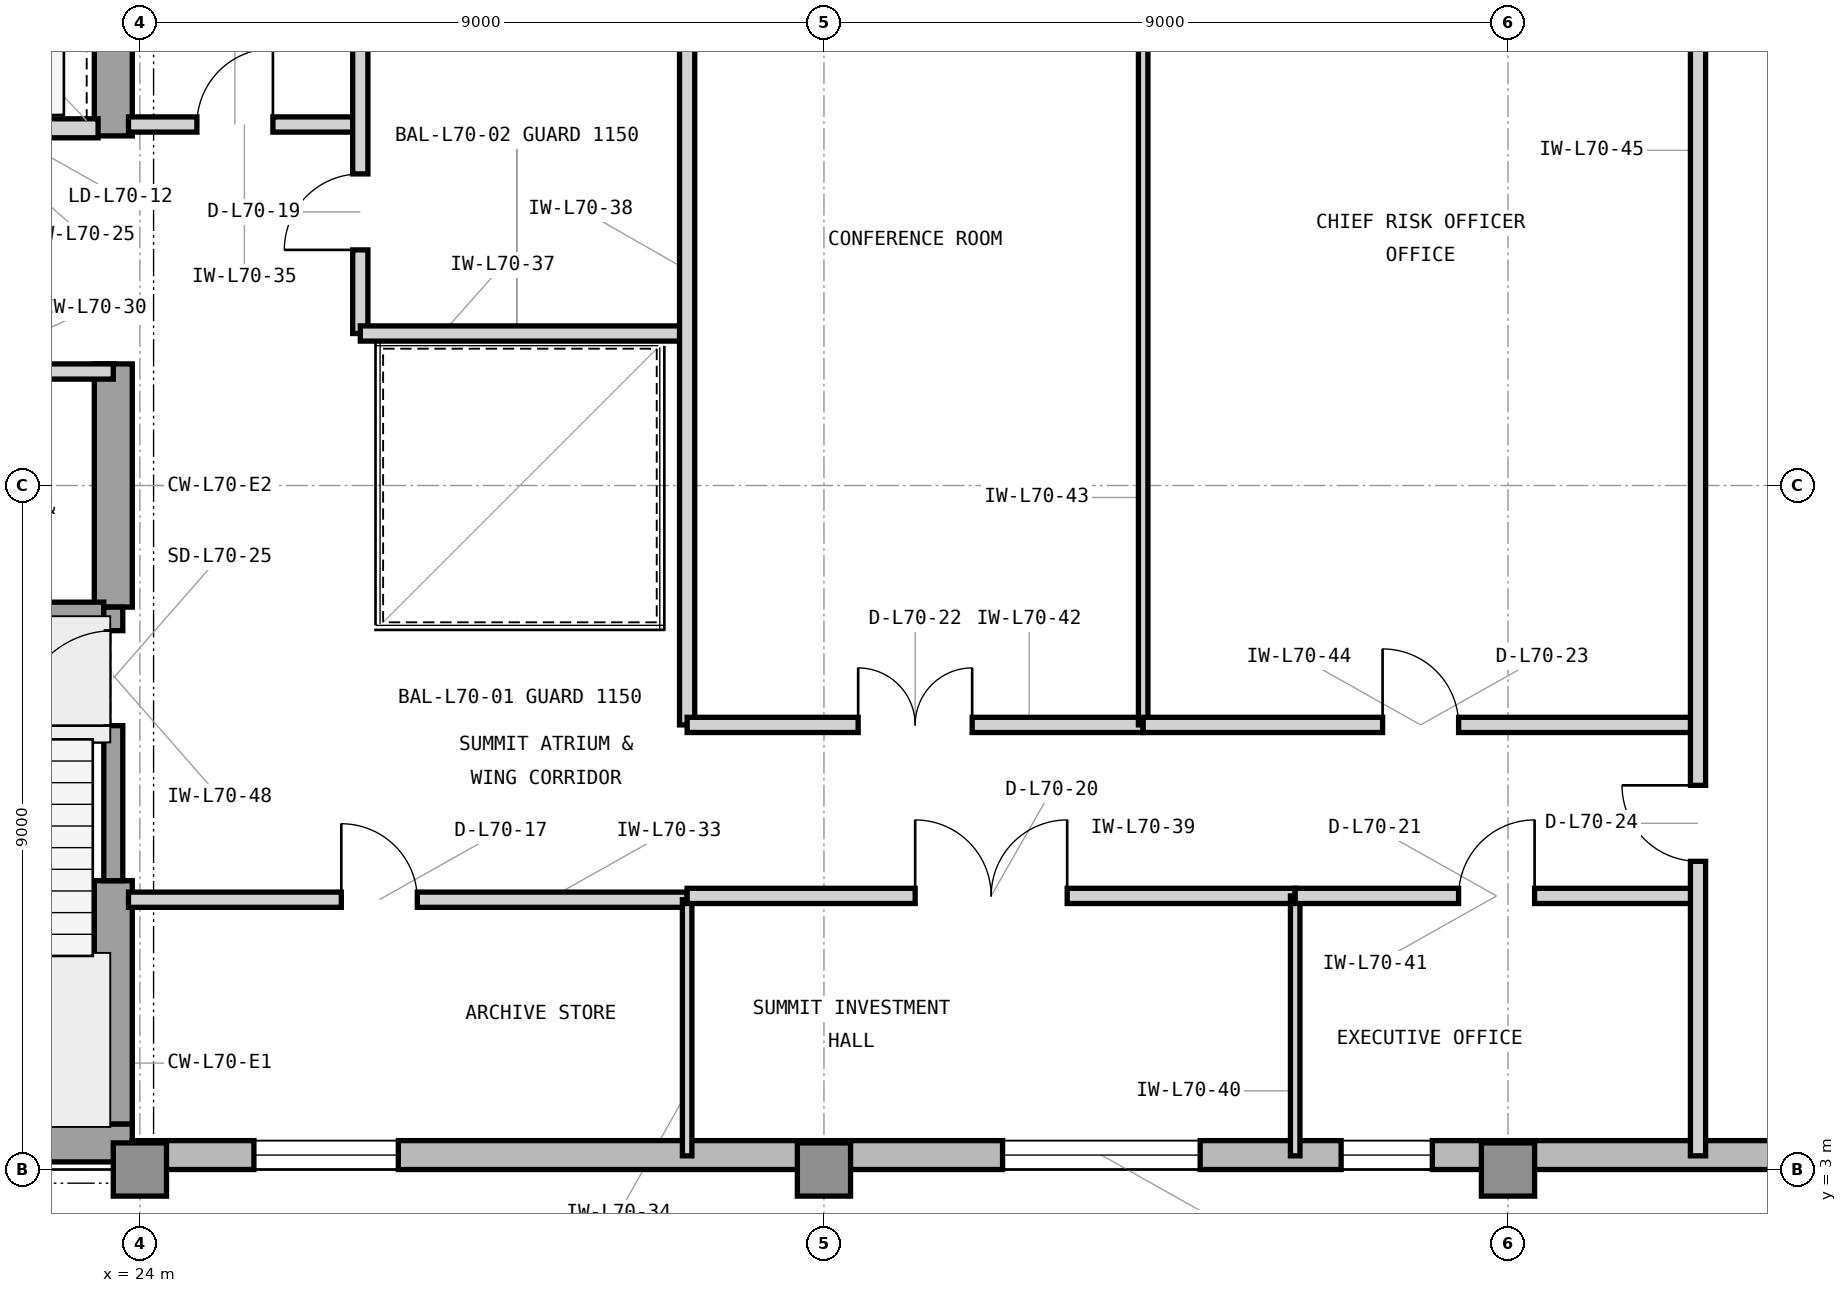
"""IFC4 building model, lengths in metres.
Left out: names, types, materials, properties, quantities, classifications, styles, units other than length and angle.
Written with IfcOpenShell. Run it as: python <this file> out.ifc"""

import sys

from ifc_helpers import new_model, si_unit, direction, frame, frame_2d, origin, origin_2d, place, context, subcontext, project, spatial, rectangle, extrude, element, fill, save


model = new_model("IFC4")
c1 = context("Model", 3, precision=1e-05, world=origin(), true_north=direction((0.0, 1.0)))
c2 = subcontext(c1, "Body", "Model", "MODEL_VIEW")
j1 = project(units=[si_unit("LENGTHUNIT", "METRE"), si_unit("PLANEANGLEUNIT", "RADIAN")], contexts=[c1])
p1 = place(None, origin())
s1 = spatial("IfcSite", under=j1, at=p1, CompositionType="ELEMENT")
p2 = place(p1, origin())
s2 = spatial("IfcBuilding", under=s1, at=p2, CompositionType="ELEMENT")
p3 = place(p2, frame((0.0, 0.0, 285.9)))
s3 = spatial("IfcBuildingStorey", under=s2, at=p3, CompositionType="ELEMENT", Elevation=285.9)
p4 = place(p3, frame((7.475, 3.35, 0.0), z_axis=(0.0, 0.0, 1.0), x_axis=(1.0, 0.0, 0.0)))
e1 = element("IfcWall", 1, at=p4, inside=s3, PredefinedType="SHEAR", context=c2, shape_type="SweptSolid", body=[
    extrude(rectangle(XDim=16.425, YDim=0.5, at=frame_2d((8.212, 0.0))), origin(), (0.0, 0.0, 1.0), 3.9),
])
p5 = place(p3, frame((23.65, 3.6, 0.0), z_axis=(0.0, 0.0, 1.0), x_axis=(0.0, 1.0, 0.0)))
e2 = element("IfcWall", 2, at=p5, inside=s3, PredefinedType="SHEAR", context=c2, shape_type="SweptSolid", body=[
    extrude(rectangle(XDim=3.2, YDim=0.5, at=frame_2d((1.6, 0.0))), origin(), (0.0, 0.0, 1.0), 3.9),
])
p6 = place(p3, frame((23.65, 10.4, 0.0), z_axis=(0.0, 0.0, 1.0), x_axis=(0.0, 1.0, 0.0)))
e3 = element("IfcWall", 3, at=p6, inside=s3, PredefinedType="SHEAR", context=c2, shape_type="SweptSolid", body=[
    extrude(rectangle(XDim=3.2, YDim=0.5, at=frame_2d((1.6, 0.0))), origin(), (0.0, 0.0, 1.0), 3.9),
])
p7 = place(p3, frame((23.65, 16.6, 0.0), z_axis=(0.0, 0.0, 1.0), x_axis=(0.0, 1.0, 0.0)))
e4 = element("IfcWall", 4, at=p7, inside=s3, PredefinedType="SHEAR", context=c2, shape_type="SweptSolid", body=[
    extrude(rectangle(XDim=4.05, YDim=0.5, at=frame_2d((2.025, 0.0))), origin(), (0.0, 0.0, 1.0), 3.9),
])
for number, where, z_axis, x_axis in (
    (5, (24.0, 3.0, 0.0), (0.0, 0.0, 1.0), (1.0, 0.0, 0.0)),
    (6, (33.0, 3.0, 0.0), (0.0, 0.0, 1.0), (1.0, 0.0, 0.0)),
    (7, (42.0, 3.0, 0.0), (0.0, 0.0, 1.0), (1.0, 0.0, 0.0)),
):
    element("IfcColumn", number, at=place(p3, frame(where, z_axis=z_axis, x_axis=x_axis)), inside=s3, PredefinedType="COLUMN", context=c2, shape_type="SweptSolid", body=[
        extrude(rectangle(XDim=0.7, YDim=0.7, at=origin_2d()), origin(), (0.0, 0.0, 1.0), 3.9),
    ])
p8 = place(p3, frame((23.9, 3.19, 0.0), z_axis=(0.0, 0.0, 1.0), x_axis=(1.0, 0.0, 0.0)))
e8 = element("IfcWall", 8, at=p8, inside=s3, PredefinedType="STANDARD", context=c2, shape_type="SweptSolid", body=[
    extrude(rectangle(XDim=25.5, YDim=0.38, at=frame_2d((12.75, 0.0))), origin(), (0.0, 0.0, 1.0), 3.715),
])
p9 = place(p8, frame((1.6, 0.0, 0.8)))
e9 = element("IfcOpeningElement", 9, at=p9, cuts=e8, PredefinedType="OPENING", context=c2, shape_type="SweptSolid", body=[
    extrude(rectangle(XDim=1.9, YDim=2.35, at=frame_2d((0.95, 1.175))), frame((0.0, 0.2, 0.0), z_axis=(0.0, -1.0, 0.0), x_axis=(1.0, 0.0, 0.0)), (0.0, 0.0, 1.0), 0.4),
])
p10 = place(p8, frame((11.45, 0.0, 0.8)))
e10 = element("IfcOpeningElement", 10, at=p10, cuts=e8, PredefinedType="OPENING", context=c2, shape_type="SweptSolid", body=[
    extrude(rectangle(XDim=2.6, YDim=2.35, at=frame_2d((1.3, 1.175))), frame((0.0, 0.2, 0.0), z_axis=(0.0, -1.0, 0.0), x_axis=(1.0, 0.0, 0.0)), (0.0, 0.0, 1.0), 0.4),
])
p11 = place(p8, frame((15.904, 0.0, 0.8)))
e11 = element("IfcOpeningElement", 11, at=p11, cuts=e8, PredefinedType="OPENING", context=c2, shape_type="SweptSolid", body=[
    extrude(rectangle(XDim=1.2, YDim=2.35, at=frame_2d((0.6, 1.175))), frame((0.0, 0.2, 0.0), z_axis=(0.0, -1.0, 0.0), x_axis=(1.0, 0.0, 0.0)), (0.0, 0.0, 1.0), 0.4),
])
p12 = place(p3, frame((21.05, 16.7, 0.0), z_axis=(0.0, 0.0, 1.0), x_axis=(1.0, 0.0, 0.0)))
e12 = element("IfcWall", 12, at=p12, inside=s3, PredefinedType="PARTITIONING", context=c2, shape_type="SweptSolid", body=[
    extrude(rectangle(XDim=2.4, YDim=0.25, at=frame_2d((1.2, 0.0))), origin(), (0.0, 0.0, 1.0), 3.354),
])
p13 = place(p12, frame((0.52, 0.0, 0.0)))
e13 = element("IfcOpeningElement", 13, at=p13, cuts=e12, PredefinedType="OPENING", context=c2, shape_type="SweptSolid", body=[
    extrude(rectangle(XDim=1.15, YDim=2.25, at=frame_2d((0.575, 1.125))), frame((0.0, 0.135, 0.0), z_axis=(0.0, -1.0, 0.0), x_axis=(1.0, 0.0, 0.0)), (0.0, 0.0, 1.0), 0.27),
])
p14 = place(p3, frame((19.9, 13.5, 0.0), z_axis=(0.0, 0.0, 1.0), x_axis=(1.0, 0.0, 0.0)))
e14 = element("IfcWall", 14, at=p14, inside=s3, PredefinedType="PARTITIONING", context=c2, shape_type="SweptSolid", body=[
    extrude(rectangle(XDim=3.75, YDim=0.2, at=frame_2d((1.875, 0.0))), origin(), (0.0, 0.0, 1.0), 3.354),
])
p15 = place(p14, frame((1.4, 0.0, 0.0)))
e15 = element("IfcOpeningElement", 15, at=p15, cuts=e14, PredefinedType="OPENING", context=c2, shape_type="SweptSolid", body=[
    extrude(rectangle(XDim=0.95, YDim=2.1, at=frame_2d((0.475, 1.05))), frame((0.0, 0.11, 0.0), z_axis=(0.0, -1.0, 0.0), x_axis=(1.0, 0.0, 0.0)), (0.0, 0.0, 1.0), 0.22),
])
p16 = place(p3, frame((23.85, 6.55, 0.0), z_axis=(0.0, 0.0, 1.0), x_axis=(1.0, 0.0, 0.0)))
e16 = element("IfcWall", 16, at=p16, inside=s3, PredefinedType="PARTITIONING", context=c2, shape_type="SweptSolid", body=[
    extrude(rectangle(XDim=7.35, YDim=0.2, at=frame_2d((3.675, 0.0))), origin(), (0.0, 0.0, 1.0), 3.705),
])
p17 = place(p16, frame((2.8, 0.0, 0.0)))
e17 = element("IfcOpeningElement", 17, at=p17, cuts=e16, PredefinedType="OPENING", context=c2, shape_type="SweptSolid", body=[
    extrude(rectangle(XDim=1.0, YDim=2.15, at=frame_2d((0.5, 1.075))), frame((0.0, 0.11, 0.0), z_axis=(0.0, -1.0, 0.0), x_axis=(1.0, 0.0, 0.0)), (0.0, 0.0, 1.0), 0.22),
])
p18 = place(p3, frame((31.2, 3.18, 0.0), z_axis=(0.0, 0.0, 1.0), x_axis=(0.0, 1.0, 0.0)))
e18 = element("IfcWall", 18, at=p18, inside=s3, PredefinedType="PARTITIONING", context=c2, shape_type="SweptSolid", body=[
    extrude(rectangle(XDim=3.37, YDim=0.125, at=frame_2d((1.685, 0.0))), origin(), (0.0, 0.0, 1.0), 3.705),
])
p19 = place(p3, frame((23.85, 16.75, 0.0), z_axis=(0.0, 0.0, 1.0), x_axis=(1.0, 0.0, 0.0)))
e19 = element("IfcWall", 19, at=p19, inside=s3, PredefinedType="PARTITIONING", context=c2, shape_type="SweptSolid", body=[
    extrude(rectangle(XDim=3.05, YDim=0.2, at=frame_2d((1.525, 0.0))), origin(), (0.0, 0.0, 1.0), 3.705),
])
p20 = place(p19, frame((0.9, 0.0, 0.0)))
e20 = element("IfcOpeningElement", 20, at=p20, cuts=e19, PredefinedType="OPENING", context=c2, shape_type="SweptSolid", body=[
    extrude(rectangle(XDim=1.0, YDim=2.15, at=frame_2d((0.5, 1.075))), frame((0.0, 0.11, 0.0), z_axis=(0.0, -1.0, 0.0), x_axis=(1.0, 0.0, 0.0)), (0.0, 0.0, 1.0), 0.22),
])
p21 = place(p3, frame((26.9, 14.0, 0.0), z_axis=(0.0, 0.0, 1.0), x_axis=(0.0, 1.0, 0.0)))
e21 = element("IfcWall", 21, at=p21, inside=s3, PredefinedType="PARTITIONING", context=c2, shape_type="SweptSolid", body=[
    extrude(rectangle(XDim=6.82, YDim=0.2, at=frame_2d((3.41, 0.0))), origin(), (0.0, 0.0, 1.0), 3.705),
])
p22 = place(p21, frame((1.1, 0.0, 0.0)))
e22 = element("IfcOpeningElement", 22, at=p22, cuts=e21, PredefinedType="OPENING", context=c2, shape_type="SweptSolid", body=[
    extrude(rectangle(XDim=1.0, YDim=2.15, at=frame_2d((0.5, 1.075))), frame((0.0, 0.11, 0.0), z_axis=(0.0, -1.0, 0.0), x_axis=(1.0, 0.0, 0.0)), (0.0, 0.0, 1.0), 0.22),
])
p23 = place(p3, frame((26.9, 14.0, 0.0), z_axis=(0.0, 0.0, 1.0), x_axis=(1.0, 0.0, 0.0)))
e23 = element("IfcWall", 23, at=p23, inside=s3, PredefinedType="PARTITIONING", context=c2, shape_type="SweptSolid", body=[
    extrude(rectangle(XDim=4.3, YDim=0.2, at=frame_2d((2.15, 0.0))), origin(), (0.0, 0.0, 1.0), 3.705),
])
p24 = place(p3, frame((31.2, 8.85, 0.0), z_axis=(0.0, 0.0, 1.0), x_axis=(0.0, 1.0, 0.0)))
e24 = element("IfcWall", 24, at=p24, inside=s3, PredefinedType="PARTITIONING", context=c2, shape_type="SweptSolid", body=[
    extrude(rectangle(XDim=11.97, YDim=0.2, at=frame_2d((5.985, 0.0))), origin(), (0.0, 0.0, 1.0), 3.705),
])
p25 = place(p3, frame((31.2, 6.6, 0.0), z_axis=(0.0, 0.0, 1.0), x_axis=(1.0, 0.0, 0.0)))
e25 = element("IfcWall", 25, at=p25, inside=s3, PredefinedType="PARTITIONING", context=c2, shape_type="SweptSolid", body=[
    extrude(rectangle(XDim=8.0, YDim=0.2, at=frame_2d((4.0, 0.0))), origin(), (0.0, 0.0, 1.0), 3.705),
])
p26 = place(p25, frame((3.0, 0.0, 0.0)))
e26 = element("IfcOpeningElement", 26, at=p26, cuts=e25, PredefinedType="OPENING", context=c2, shape_type="SweptSolid", body=[
    extrude(rectangle(XDim=2.0, YDim=2.5, at=frame_2d((1.0, 1.25))), frame((0.0, 0.11, 0.0), z_axis=(0.0, -1.0, 0.0), x_axis=(1.0, 0.0, 0.0)), (0.0, 0.0, 1.0), 0.22),
])
p27 = place(p3, frame((39.2, 3.18, 0.0), z_axis=(0.0, 0.0, 1.0), x_axis=(0.0, 1.0, 0.0)))
e27 = element("IfcWall", 27, at=p27, inside=s3, PredefinedType="PARTITIONING", context=c2, shape_type="SweptSolid", body=[
    extrude(rectangle(XDim=3.42, YDim=0.125, at=frame_2d((1.71, 0.0))), origin(), (0.0, 0.0, 1.0), 3.705),
])
p28 = place(p3, frame((39.2, 6.6, 0.0), z_axis=(0.0, 0.0, 1.0), x_axis=(1.0, 0.0, 0.0)))
e28 = element("IfcWall", 28, at=p28, inside=s3, PredefinedType="PARTITIONING", context=c2, shape_type="SweptSolid", body=[
    extrude(rectangle(XDim=5.3, YDim=0.2, at=frame_2d((2.65, 0.0))), origin(), (0.0, 0.0, 1.0), 3.705),
])
p29 = place(p28, frame((2.15, 0.0, 0.0)))
e29 = element("IfcOpeningElement", 29, at=p29, cuts=e28, PredefinedType="OPENING", context=c2, shape_type="SweptSolid", body=[
    extrude(rectangle(XDim=1.0, YDim=2.15, at=frame_2d((0.5, 1.075))), frame((0.0, 0.11, 0.0), z_axis=(0.0, -1.0, 0.0), x_axis=(1.0, 0.0, 0.0)), (0.0, 0.0, 1.0), 0.22),
])
p30 = place(p3, frame((31.2, 8.85, 0.0), z_axis=(0.0, 0.0, 1.0), x_axis=(1.0, 0.0, 0.0)))
e30 = element("IfcWall", 30, at=p30, inside=s3, PredefinedType="PARTITIONING", context=c2, shape_type="SweptSolid", body=[
    extrude(rectangle(XDim=6.0, YDim=0.2, at=frame_2d((3.0, 0.0))), origin(), (0.0, 0.0, 1.0), 3.705),
])
p31 = place(p30, frame((2.25, 0.0, 0.0)))
e31 = element("IfcOpeningElement", 31, at=p31, cuts=e30, PredefinedType="OPENING", context=c2, shape_type="SweptSolid", body=[
    extrude(rectangle(XDim=1.5, YDim=2.3, at=frame_2d((0.75, 1.15))), frame((0.0, 0.11, 0.0), z_axis=(0.0, -1.0, 0.0), x_axis=(1.0, 0.0, 0.0)), (0.0, 0.0, 1.0), 0.22),
])
p32 = place(p3, frame((37.2, 8.85, 0.0), z_axis=(0.0, 0.0, 1.0), x_axis=(0.0, 1.0, 0.0)))
e32 = element("IfcWall", 32, at=p32, inside=s3, PredefinedType="PARTITIONING", context=c2, shape_type="SweptSolid", body=[
    extrude(rectangle(XDim=11.97, YDim=0.125, at=frame_2d((5.985, 0.0))), origin(), (0.0, 0.0, 1.0), 3.705),
])
p33 = place(p3, frame((37.2, 8.85, 0.0), z_axis=(0.0, 0.0, 1.0), x_axis=(1.0, 0.0, 0.0)))
e33 = element("IfcWall", 33, at=p33, inside=s3, PredefinedType="PARTITIONING", context=c2, shape_type="SweptSolid", body=[
    extrude(rectangle(XDim=7.3, YDim=0.2, at=frame_2d((3.65, 0.0))), origin(), (0.0, 0.0, 1.0), 3.705),
])
p34 = place(p33, frame((3.15, 0.0, 0.0)))
e34 = element("IfcOpeningElement", 34, at=p34, cuts=e33, PredefinedType="OPENING", context=c2, shape_type="SweptSolid", body=[
    extrude(rectangle(XDim=1.0, YDim=2.15, at=frame_2d((0.5, 1.075))), frame((0.0, 0.11, 0.0), z_axis=(0.0, -1.0, 0.0), x_axis=(1.0, 0.0, 0.0)), (0.0, 0.0, 1.0), 0.22),
])
p35 = place(p3, frame((44.5, 3.18, 0.0), z_axis=(0.0, 0.0, 1.0), x_axis=(0.0, 1.0, 0.0)))
e35 = element("IfcWall", 35, at=p35, inside=s3, PredefinedType="PARTITIONING", context=c2, shape_type="SweptSolid", body=[
    extrude(rectangle(XDim=17.64, YDim=0.2, at=frame_2d((8.82, 0.0))), origin(), (0.0, 0.0, 1.0), 3.705),
])
p36 = place(p35, frame((3.875, 0.0, 0.0)))
e36 = element("IfcOpeningElement", 36, at=p36, cuts=e35, PredefinedType="OPENING", context=c2, shape_type="SweptSolid", body=[
    extrude(rectangle(XDim=1.0, YDim=2.15, at=frame_2d((0.5, 1.075))), frame((0.0, 0.11, 0.0), z_axis=(0.0, -1.0, 0.0), x_axis=(1.0, 0.0, 0.0)), (0.0, 0.0, 1.0), 0.22),
])
p37 = place(p3, frame((19.705, 10.34, 0.0), z_axis=(0.0, 0.0, 1.0), x_axis=(1.0, 0.0, 0.0)))
e37 = element("IfcWall", 37, at=p37, inside=s3, PredefinedType="SHEAR", context=c2, shape_type="SweptSolid", body=[
    extrude(rectangle(XDim=3.82, YDim=0.25, at=frame_2d((1.91, 0.0))), origin(), (0.0, 0.0, 1.0), 3.9),
])
p38 = place(p3, frame((23.65, 6.8, 0.0), z_axis=(0.0, 0.0, 1.0), x_axis=(0.0, 1.0, 0.0)))
e38 = element("IfcWall", 38, at=p38, inside=s3, PredefinedType="SHEAR", context=c2, shape_type="SweptSolid", body=[
    extrude(rectangle(XDim=3.6, YDim=0.25, at=frame_2d((1.8, 0.0))), origin(), (0.0, 0.0, 1.0), 3.9),
])
p39 = place(p38, frame((2.04, 0.0, 0.0)))
e39 = element("IfcOpeningElement", 39, at=p39, cuts=e38, PredefinedType="OPENING", context=c2, shape_type="SweptSolid", body=[
    extrude(rectangle(XDim=1.25, YDim=2.2, at=frame_2d((0.625, 1.1))), frame((0.0, 0.135, 0.0), z_axis=(0.0, -1.0, 0.0), x_axis=(1.0, 0.0, 0.0)), (0.0, 0.0, 1.0), 0.27),
])
p40 = place(p9, origin())
e40 = element("IfcWindow", 40, at=p40, inside=s3, PartitioningType="SINGLE_PANEL", PredefinedType="WINDOW", context=c2, shape_type="SweptSolid", body=[
    extrude(rectangle(XDim=1.9, YDim=2.35, at=frame_2d((0.95, 1.175))), frame((0.0, 0.11, 0.0), z_axis=(0.0, -1.0, 0.0), x_axis=(1.0, 0.0, 0.0)), (0.0, 0.0, 1.0), 0.06),
])
fill(e9, e40)
p41 = place(p10, origin())
e41 = element("IfcWindow", 41, at=p41, inside=s3, PartitioningType="SINGLE_PANEL", PredefinedType="WINDOW", context=c2, shape_type="SweptSolid", body=[
    extrude(rectangle(XDim=2.6, YDim=2.35, at=frame_2d((1.3, 1.175))), frame((0.0, 0.11, 0.0), z_axis=(0.0, -1.0, 0.0), x_axis=(1.0, 0.0, 0.0)), (0.0, 0.0, 1.0), 0.06),
])
fill(e10, e41)
p42 = place(p17, origin())
e42 = element("IfcDoor", 42, at=p42, inside=s3, OperationType="SINGLE_SWING_LEFT", PredefinedType="DOOR", context=c2, shape_type="SweptSolid", body=[
    extrude(rectangle(XDim=1.0, YDim=2.15, at=frame_2d((0.5, 1.075))), frame((0.0, 0.025, 0.0), z_axis=(0.0, -1.0, 0.0), x_axis=(1.0, 0.0, 0.0)), (0.0, 0.0, 1.0), 0.05),
])
fill(e17, e42)
p43 = place(p20, origin())
e43 = element("IfcDoor", 43, at=p43, inside=s3, OperationType="SINGLE_SWING_RIGHT", PredefinedType="DOOR", context=c2, shape_type="SweptSolid", body=[
    extrude(rectangle(XDim=1.0, YDim=2.15, at=frame_2d((0.5, 1.075))), frame((0.0, 0.025, 0.0), z_axis=(0.0, -1.0, 0.0), x_axis=(1.0, 0.0, 0.0)), (0.0, 0.0, 1.0), 0.05),
])
fill(e20, e43)
p44 = place(p22, origin())
e44 = element("IfcDoor", 44, at=p44, inside=s3, OperationType="SINGLE_SWING_LEFT", PredefinedType="DOOR", context=c2, shape_type="SweptSolid", body=[
    extrude(rectangle(XDim=1.0, YDim=2.15, at=frame_2d((0.5, 1.075))), frame((0.0, 0.025, 0.0), z_axis=(0.0, -1.0, 0.0), x_axis=(1.0, 0.0, 0.0)), (0.0, 0.0, 1.0), 0.05),
])
fill(e22, e44)
p45 = place(p26, origin())
e45 = element("IfcDoor", 45, at=p45, inside=s3, OperationType="DOUBLE_DOOR_SINGLE_SWING", PredefinedType="DOOR", context=c2, shape_type="SweptSolid", body=[
    extrude(rectangle(XDim=2.0, YDim=2.5, at=frame_2d((1.0, 1.25))), frame((0.0, 0.025, 0.0), z_axis=(0.0, -1.0, 0.0), x_axis=(1.0, 0.0, 0.0)), (0.0, 0.0, 1.0), 0.05),
])
fill(e26, e45)
p46 = place(p29, origin())
e46 = element("IfcDoor", 46, at=p46, inside=s3, OperationType="SINGLE_SWING_RIGHT", PredefinedType="DOOR", context=c2, shape_type="SweptSolid", body=[
    extrude(rectangle(XDim=1.0, YDim=2.15, at=frame_2d((0.5, 1.075))), frame((0.0, 0.025, 0.0), z_axis=(0.0, -1.0, 0.0), x_axis=(1.0, 0.0, 0.0)), (0.0, 0.0, 1.0), 0.05),
])
fill(e29, e46)
p47 = place(p31, origin())
e47 = element("IfcDoor", 47, at=p47, inside=s3, OperationType="DOUBLE_DOOR_SINGLE_SWING", PredefinedType="DOOR", context=c2, shape_type="SweptSolid", body=[
    extrude(rectangle(XDim=1.5, YDim=2.3, at=frame_2d((0.75, 1.15))), frame((0.0, 0.025, 0.0), z_axis=(0.0, -1.0, 0.0), x_axis=(1.0, 0.0, 0.0)), (0.0, 0.0, 1.0), 0.05),
])
fill(e31, e47)
p48 = place(p34, origin())
e48 = element("IfcDoor", 48, at=p48, inside=s3, OperationType="SINGLE_SWING_LEFT", PredefinedType="DOOR", context=c2, shape_type="SweptSolid", body=[
    extrude(rectangle(XDim=1.0, YDim=2.15, at=frame_2d((0.5, 1.075))), frame((0.0, 0.025, 0.0), z_axis=(0.0, -1.0, 0.0), x_axis=(1.0, 0.0, 0.0)), (0.0, 0.0, 1.0), 0.05),
])
fill(e34, e48)
p49 = place(p36, origin())
e49 = element("IfcDoor", 49, at=p49, inside=s3, OperationType="SINGLE_SWING_RIGHT", PredefinedType="DOOR", context=c2, shape_type="SweptSolid", body=[
    extrude(rectangle(XDim=1.0, YDim=2.15, at=frame_2d((0.5, 1.075))), frame((0.0, 0.025, 0.0), z_axis=(0.0, -1.0, 0.0), x_axis=(1.0, 0.0, 0.0)), (0.0, 0.0, 1.0), 0.05),
])
fill(e36, e49)
p50 = place(p39, origin())
e50 = element("IfcDoor", 50, at=p50, inside=s3, OperationType="SINGLE_SWING_LEFT", PredefinedType="DOOR", context=c2, shape_type="SweptSolid", body=[
    extrude(rectangle(XDim=1.25, YDim=2.2, at=frame_2d((0.625, 1.1))), frame((0.0, 0.025, 0.0), z_axis=(0.0, -1.0, 0.0), x_axis=(1.0, 0.0, 0.0)), (0.0, 0.0, 1.0), 0.05),
])
fill(e39, e50)
p51 = place(p11, origin())
e51 = element("IfcWindow", 51, at=p51, inside=s3, PartitioningType="SINGLE_PANEL", PredefinedType="WINDOW", context=c2, shape_type="SweptSolid", body=[
    extrude(rectangle(XDim=1.2, YDim=2.35, at=frame_2d((0.6, 1.175))), frame((0.0, 0.11, 0.0), z_axis=(0.0, -1.0, 0.0), x_axis=(1.0, 0.0, 0.0)), (0.0, 0.0, 1.0), 0.06),
])
fill(e11, e51)
save(model, sys.argv[1])
